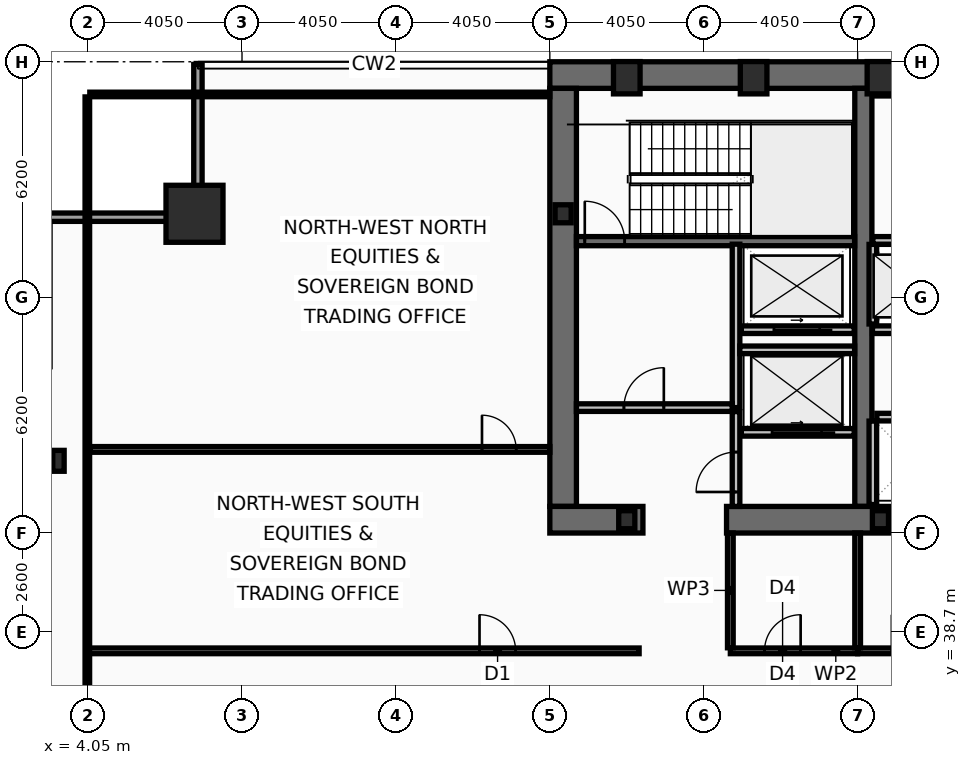
"""IFC4 building model, lengths in metres.
Left out: names, types, materials, properties, quantities, classifications, styles, units other than length and angle.
Written with IfcOpenShell. Run it as: python <this file> out.ifc"""

import sys

from ifc_helpers import new_model, si_unit, direction, frame, frame_2d, origin, origin_2d, place, context, subcontext, project, spatial, rectangle, hollow_rectangle, i_section, extrude, element, fill, save


model = new_model("IFC4")
c1 = context("Model", 3, precision=1e-05, world=origin(), true_north=direction((0.0, 1.0)))
c2 = subcontext(c1, "Body", "Model", "MODEL_VIEW")
j1 = project(units=[si_unit("LENGTHUNIT", "METRE"), si_unit("PLANEANGLEUNIT", "RADIAN")], contexts=[c1])
p1 = place(None, origin())
s1 = spatial("IfcSite", under=j1, at=p1, CompositionType="ELEMENT")
p2 = place(p1, origin())
s2 = spatial("IfcBuilding", under=s1, at=p2, CompositionType="ELEMENT")
p3 = place(p2, frame((0.0, 0.0, 98.6)))
s3 = spatial("IfcBuildingStorey", under=s2, at=p3, CompositionType="ELEMENT", Elevation=98.6)
p4 = place(p3, frame((16.2, 53.35, 0.0), z_axis=(0.0, 0.0, 1.0), x_axis=(1.0, 0.0, 0.0)))
e1 = element("IfcWall", 1, at=p4, inside=s3, PredefinedType="SHEAR", context=c2, shape_type="SweptSolid", body=[
    extrude(rectangle(XDim=40.5, YDim=0.7, at=frame_2d((20.25, 0.0))), origin(), (0.0, 0.0, 1.0), 3.82),
])
p5 = place(p3, frame((16.55, 42.0, 0.0), z_axis=(0.0, 0.0, 1.0), x_axis=(0.0, 1.0, 0.0)))
e2 = element("IfcWall", 2, at=p5, inside=s3, PredefinedType="SHEAR", context=c2, shape_type="SweptSolid", body=[
    extrude(rectangle(XDim=11.0, YDim=0.7, at=frame_2d((5.5, 0.0))), origin(), (0.0, 0.0, 1.0), 3.82),
])
p6 = place(p3, frame((24.45, 42.0, 0.0), z_axis=(0.0, 0.0, 1.0), x_axis=(0.0, 1.0, 0.0)))
e3 = element("IfcWall", 3, at=p6, inside=s3, PredefinedType="SHEAR", context=c2, shape_type="SweptSolid", body=[
    extrude(rectangle(XDim=11.0, YDim=0.45, at=frame_2d((5.5, 0.0))), origin(), (0.0, 0.0, 1.0), 3.82),
])
p7 = place(p3, frame((18.65, 41.65, 0.0), z_axis=(0.0, 0.0, 1.0), x_axis=(-1.0, 0.0, 0.0)))
e4 = element("IfcWall", 4, at=p7, inside=s3, PredefinedType="SHEAR", context=c2, shape_type="SweptSolid", body=[
    extrude(rectangle(XDim=2.45, YDim=0.7, at=frame_2d((1.225, 0.0))), origin(), (0.0, 0.0, 1.0), 3.82),
])
p8 = place(p3, frame((32.3, 41.65, 0.0), z_axis=(0.0, 0.0, 1.0), x_axis=(-1.0, 0.0, 0.0)))
e5 = element("IfcWall", 5, at=p8, inside=s3, PredefinedType="SHEAR", context=c2, shape_type="SweptSolid", body=[
    extrude(rectangle(XDim=11.45, YDim=0.7, at=frame_2d((5.725, 0.0))), origin(), (0.0, 0.0, 1.0), 3.82),
])
p9 = place(p3, frame((16.9, 48.98, 0.0), z_axis=(0.0, 0.0, 1.0), x_axis=(1.0, 0.0, 0.0)))
e6 = element("IfcWall", 6, at=p9, inside=s3, PredefinedType="SHEAR", context=c2, shape_type="SweptSolid", body=[
    extrude(rectangle(XDim=7.32, YDim=0.24, at=frame_2d((3.66, 0.0))), origin(), (0.0, 0.0, 1.0), 3.82),
])
p10 = place(p9, frame((0.22, 0.0, 0.0)))
e7 = element("IfcOpeningElement", 7, at=p10, cuts=e6, PredefinedType="OPENING", context=c2, shape_type="SweptSolid", body=[
    extrude(rectangle(XDim=1.05, YDim=2.15, at=frame_2d((0.525, 1.075))), frame((0.0, 0.13, 0.0), z_axis=(0.0, -1.0, 0.0), x_axis=(1.0, 0.0, 0.0)), (0.0, 0.0, 1.0), 0.26),
])
p11 = place(p3, frame((6.85, 49.7, 0.0), z_axis=(0.0, 0.0, 1.0), x_axis=(1.0, 0.0, 0.0)))
e8 = element("IfcColumn", 8, at=p11, inside=s3, PredefinedType="COLUMN", context=c2, shape_type="SweptSolid", body=[
    extrude(hollow_rectangle(XDim=1.5, YDim=1.5, WallThickness=0.07, at=origin_2d()), origin(), (0.0, 0.0, 1.0), 4.0),
])
for number, where, z_axis, x_axis in (
    (9, (18.225, 53.28, 0.0), (0.0, 0.0, 1.0), (1.0, 0.0, 0.0)),
    (10, (21.562, 53.28, 0.0), (0.0, 0.0, 1.0), (1.0, 0.0, 0.0)),
    (11, (24.9, 53.28, 0.0), (0.0, 0.0, 1.0), (1.0, 0.0, 0.0)),
):
    element("IfcColumn", number, at=place(p3, frame(where, z_axis=z_axis, x_axis=x_axis)), inside=s3, PredefinedType="COLUMN", context=c2, shape_type="SweptSolid", body=[
        extrude(hollow_rectangle(XDim=0.7, YDim=0.85, WallThickness=0.05, at=origin_2d()), origin(), (0.0, 0.0, 1.0), 4.0),
    ])
p12 = place(p3, frame((3.27, 43.2, 0.0), z_axis=(0.0, 0.0, 1.0), x_axis=(1.0, 0.0, 0.0)))
e12 = element("IfcColumn", 12, at=p12, inside=s3, PredefinedType="COLUMN", context=c2, shape_type="SweptSolid", body=[
    extrude(i_section(OverallWidth=0.3, OverallDepth=0.55, WebThickness=0.015, FlangeThickness=0.029, at=origin_2d()), origin(), (0.0, 0.0, 1.0), 4.0),
])
for number, where, z_axis, x_axis in (
    (13, (16.55, 49.7, 0.0), (0.0, 0.0, 1.0), (1.0, 0.0, 0.0)),
    (14, (18.225, 41.65, 0.0), (0.0, 0.0, 1.0), (1.0, 0.0, 0.0)),
    (15, (24.9, 41.65, 0.0), (0.0, 0.0, 1.0), (1.0, 0.0, 0.0)),
):
    element("IfcColumn", number, at=place(p3, frame(where, z_axis=z_axis, x_axis=x_axis)), inside=s3, PredefinedType="COLUMN", context=c2, shape_type="SweptSolid", body=[
        extrude(i_section(OverallWidth=0.424, OverallDepth=0.474, WebThickness=0.048, FlangeThickness=0.077, at=origin_2d()), origin(), (0.0, 0.0, 1.0), 4.0),
    ])
p13 = place(p3, frame((2.83, 49.61, 0.0), z_axis=(0.0, 0.0, 1.0), x_axis=(1.0, 0.0, 0.0)))
e16 = element("IfcWall", 16, at=p13, inside=s3, PredefinedType="SOLIDWALL", context=c2, shape_type="SweptSolid", body=[
    extrude(rectangle(XDim=4.22, YDim=0.22, at=frame_2d((2.11, 0.0))), origin(), (0.0, 0.0, 1.0), 3.16),
])
p14 = place(p3, frame((6.94, 49.72, 0.0), z_axis=(0.0, 0.0, 1.0), x_axis=(0.0, 1.0, 0.0)))
e17 = element("IfcWall", 17, at=p14, inside=s3, PredefinedType="SOLIDWALL", context=c2, shape_type="SweptSolid", body=[
    extrude(rectangle(XDim=3.91, YDim=0.22, at=frame_2d((1.955, 0.0))), origin(), (0.0, 0.0, 1.0), 3.16),
])
p15 = place(p3, frame((24.21, 43.95, 0.0), z_axis=(0.0, 0.0, 1.0), x_axis=(-1.0, 0.0, 0.0)))
e18 = element("IfcWall", 18, at=p15, inside=s3, PredefinedType="PARTITIONING", context=c2, shape_type="SweptSolid", body=[
    extrude(rectangle(XDim=2.97, YDim=0.2, at=frame_2d((1.485, 0.0))), origin(), (0.0, 0.0, 1.0), 3.82),
])
p16 = place(p15, frame((0.86, 0.0, 0.0)))
e19 = element("IfcOpeningElement", 19, at=p16, cuts=e18, PredefinedType="OPENING", context=c2, shape_type="SweptSolid", body=[
    extrude(rectangle(XDim=1.3, YDim=2.18, at=frame_2d((0.65, 1.09))), frame((0.0, 0.11, 0.0), z_axis=(0.0, -1.0, 0.0), x_axis=(1.0, 0.0, 0.0)), (0.0, 0.0, 1.0), 0.22),
])
p17 = place(p3, frame((24.21, 46.65, 0.0), z_axis=(0.0, 0.0, 1.0), x_axis=(-1.0, 0.0, 0.0)))
e20 = element("IfcWall", 20, at=p17, inside=s3, PredefinedType="PARTITIONING", context=c2, shape_type="SweptSolid", body=[
    extrude(rectangle(XDim=2.97, YDim=0.2, at=frame_2d((1.485, 0.0))), origin(), (0.0, 0.0, 1.0), 3.82),
])
p18 = place(p17, frame((0.91, 0.0, 0.0)))
e21 = element("IfcOpeningElement", 21, at=p18, cuts=e20, PredefinedType="OPENING", context=c2, shape_type="SweptSolid", body=[
    extrude(rectangle(XDim=1.2, YDim=2.18, at=frame_2d((0.6, 1.09))), frame((0.0, 0.11, 0.0), z_axis=(0.0, -1.0, 0.0), x_axis=(1.0, 0.0, 0.0)), (0.0, 0.0, 1.0), 0.22),
])
p19 = place(p3, frame((31.22, 46.65, 0.0), z_axis=(0.0, 0.0, 1.0), x_axis=(-1.0, 0.0, 0.0)))
e22 = element("IfcWall", 22, at=p19, inside=s3, PredefinedType="PARTITIONING", context=c2, shape_type="SweptSolid", body=[
    extrude(rectangle(XDim=6.53, YDim=0.2, at=frame_2d((3.265, 0.0))), origin(), (0.0, 0.0, 1.0), 3.82),
])
p20 = place(p19, frame((4.9, 0.0, 0.0)))
e23 = element("IfcOpeningElement", 23, at=p20, cuts=e22, PredefinedType="OPENING", context=c2, shape_type="SweptSolid", body=[
    extrude(rectangle(XDim=1.1, YDim=2.18, at=frame_2d((0.55, 1.09))), frame((0.0, 0.11, 0.0), z_axis=(0.0, -1.0, 0.0), x_axis=(1.0, 0.0, 0.0)), (0.0, 0.0, 1.0), 0.22),
])
p21 = place(p19, frame((2.74, 0.0, 0.0)))
e24 = element("IfcOpeningElement", 24, at=p21, cuts=e22, PredefinedType="OPENING", context=c2, shape_type="SweptSolid", body=[
    extrude(rectangle(XDim=1.1, YDim=2.18, at=frame_2d((0.55, 1.09))), frame((0.0, 0.11, 0.0), z_axis=(0.0, -1.0, 0.0), x_axis=(1.0, 0.0, 0.0)), (0.0, 0.0, 1.0), 0.22),
])
p22 = place(p19, frame((0.58, 0.0, 0.0)))
e25 = element("IfcOpeningElement", 25, at=p22, cuts=e22, PredefinedType="OPENING", context=c2, shape_type="SweptSolid", body=[
    extrude(rectangle(XDim=1.1, YDim=2.18, at=frame_2d((0.55, 1.09))), frame((0.0, 0.11, 0.0), z_axis=(0.0, -1.0, 0.0), x_axis=(1.0, 0.0, 0.0)), (0.0, 0.0, 1.0), 0.22),
])
p23 = place(p3, frame((21.1, 44.6, 0.0), z_axis=(0.0, 0.0, 1.0), x_axis=(0.0, 1.0, 0.0)))
e26 = element("IfcWall", 26, at=p23, inside=s3, PredefinedType="PARTITIONING", context=c2, shape_type="SweptSolid", body=[
    extrude(rectangle(XDim=4.3, YDim=0.2, at=frame_2d((2.15, 0.0))), origin(), (0.0, 0.0, 1.0), 3.82),
])
p24 = place(p3, frame((16.9, 44.6, 0.0), z_axis=(0.0, 0.0, 1.0), x_axis=(1.0, 0.0, 0.0)))
e27 = element("IfcWall", 27, at=p24, inside=s3, PredefinedType="PARTITIONING", context=c2, shape_type="SweptSolid", body=[
    extrude(rectangle(XDim=4.1, YDim=0.2, at=frame_2d((2.05, 0.0))), origin(), (0.0, 0.0, 1.0), 3.82),
])
p25 = place(p24, frame((1.25, 0.0, 0.0)))
e28 = element("IfcOpeningElement", 28, at=p25, cuts=e27, PredefinedType="OPENING", context=c2, shape_type="SweptSolid", body=[
    extrude(rectangle(XDim=1.05, YDim=2.15, at=frame_2d((0.525, 1.075))), frame((0.0, 0.11, 0.0), z_axis=(0.0, -1.0, 0.0), x_axis=(1.0, 0.0, 0.0)), (0.0, 0.0, 1.0), 0.22),
])
p26 = place(p3, frame((21.2, 46.12, 0.0), z_axis=(0.0, 0.0, 1.0), x_axis=(1.0, 0.0, 0.0)))
e29 = element("IfcWall", 29, at=p26, inside=s3, PredefinedType="PARTITIONING", context=c2, shape_type="SweptSolid", body=[
    extrude(rectangle(XDim=3.02, YDim=0.2, at=frame_2d((1.51, 0.0))), origin(), (0.0, 0.0, 1.0), 3.82),
])
p27 = place(p3, frame((21.1, 42.0, 0.0), z_axis=(0.0, 0.0, 1.0), x_axis=(0.0, 1.0, 0.0)))
e30 = element("IfcWall", 30, at=p27, inside=s3, PredefinedType="PARTITIONING", context=c2, shape_type="SweptSolid", body=[
    extrude(rectangle(XDim=2.495, YDim=0.2, at=frame_2d((1.248, 0.0))), origin(), (0.0, 0.0, 1.0), 3.82),
])
p28 = place(p27, frame((0.38, 0.0, 0.0)))
e31 = element("IfcOpeningElement", 31, at=p28, cuts=e30, PredefinedType="OPENING", context=c2, shape_type="SweptSolid", body=[
    extrude(rectangle(XDim=1.05, YDim=2.15, at=frame_2d((0.525, 1.075))), frame((0.0, 0.11, 0.0), z_axis=(0.0, -1.0, 0.0), x_axis=(1.0, 0.0, 0.0)), (0.0, 0.0, 1.0), 0.22),
])
p29 = place(p3, frame((24.7, 46.8, 0.0), z_axis=(0.0, 0.0, 1.0), x_axis=(0.0, 1.0, 0.0)))
e32 = element("IfcWall", 32, at=p29, inside=s3, PredefinedType="PARTITIONING", context=c2, shape_type="SweptSolid", body=[
    extrude(rectangle(XDim=2.095, YDim=0.2, at=frame_2d((1.047, 0.0))), origin(), (0.0, 0.0, 1.0), 3.82),
])
p30 = place(p3, frame((24.805, 44.35, 0.0), z_axis=(0.0, 0.0, 1.0), x_axis=(1.0, 0.0, 0.0)))
e33 = element("IfcWall", 33, at=p30, inside=s3, PredefinedType="PARTITIONING", context=c2, shape_type="SweptSolid", body=[
    extrude(rectangle(XDim=6.27, YDim=0.2, at=frame_2d((3.135, 0.0))), origin(), (0.0, 0.0, 1.0), 3.82),
])
p31 = place(p3, frame((24.7, 42.05, 0.0), z_axis=(0.0, 0.0, 1.0), x_axis=(0.0, 1.0, 0.0)))
e34 = element("IfcWall", 34, at=p31, inside=s3, PredefinedType="PARTITIONING", context=c2, shape_type="SweptSolid", body=[
    extrude(rectangle(XDim=2.195, YDim=0.2, at=frame_2d((1.098, 0.0))), origin(), (0.0, 0.0, 1.0), 3.82),
])
p32 = place(p3, frame((24.7, 52.86, 0.0), z_axis=(0.0, 0.0, 1.0), x_axis=(1.0, 0.0, 0.0)))
e35 = element("IfcWall", 35, at=p32, inside=s3, PredefinedType="PARTITIONING", context=c2, shape_type="SweptSolid", body=[
    extrude(rectangle(XDim=7.72, YDim=0.12, at=frame_2d((3.86, 0.0))), origin(), (0.0, 0.0, 1.0), 3.82),
])
p33 = place(p3, frame((24.7, 49.0, 0.0), z_axis=(0.0, 0.0, 1.0), x_axis=(1.0, 0.0, 0.0)))
e36 = element("IfcWall", 36, at=p33, inside=s3, PredefinedType="PARTITIONING", context=c2, shape_type="SweptSolid", body=[
    extrude(rectangle(XDim=7.72, YDim=0.2, at=frame_2d((3.86, 0.0))), origin(), (0.0, 0.0, 1.0), 3.82),
])
p34 = place(p33, frame((6.56, 0.0, 0.0)))
e37 = element("IfcOpeningElement", 37, at=p34, cuts=e36, PredefinedType="OPENING", context=c2, shape_type="SweptSolid", body=[
    extrude(rectangle(XDim=0.95, YDim=2.1, at=frame_2d((0.475, 1.05))), frame((0.0, 0.11, 0.0), z_axis=(0.0, -1.0, 0.0), x_axis=(1.0, 0.0, 0.0)), (0.0, 0.0, 1.0), 0.22),
])
p35 = place(p3, frame((20.95, 38.2, 0.0), z_axis=(0.0, 0.0, 1.0), x_axis=(1.0, 0.0, 0.0)))
e38 = element("IfcWall", 38, at=p35, inside=s3, PredefinedType="PARTITIONING", context=c2, shape_type="SweptSolid", body=[
    extrude(rectangle(XDim=3.35, YDim=0.15, at=frame_2d((1.675, 0.0))), origin(), (0.0, 0.0, 1.0), 3.82),
])
p36 = place(p35, frame((0.9, 0.0, 0.0)))
e39 = element("IfcOpeningElement", 39, at=p36, cuts=e38, PredefinedType="OPENING", context=c2, shape_type="SweptSolid", body=[
    extrude(rectangle(XDim=0.95, YDim=2.05, at=frame_2d((0.475, 1.025))), frame((0.0, 0.085, 0.0), z_axis=(0.0, -1.0, 0.0), x_axis=(1.0, 0.0, 0.0)), (0.0, 0.0, 1.0), 0.17),
])
p37 = place(p3, frame((24.3, 38.2, 0.0), z_axis=(0.0, 0.0, 1.0), x_axis=(1.0, 0.0, 0.0)))
e40 = element("IfcWall", 40, at=p37, inside=s3, PredefinedType="PARTITIONING", context=c2, shape_type="SweptSolid", body=[
    extrude(rectangle(XDim=4.5, YDim=0.15, at=frame_2d((2.25, 0.0))), origin(), (0.0, 0.0, 1.0), 3.01),
])
p38 = place(p37, frame((0.9, 0.0, 0.0)))
e41 = element("IfcOpeningElement", 41, at=p38, cuts=e40, PredefinedType="OPENING", context=c2, shape_type="SweptSolid", body=[
    extrude(rectangle(XDim=0.95, YDim=2.05, at=frame_2d((0.475, 1.025))), frame((0.0, 0.085, 0.0), z_axis=(0.0, -1.0, 0.0), x_axis=(1.0, 0.0, 0.0)), (0.0, 0.0, 1.0), 0.17),
])
for number, where, z_axis, x_axis in (
    (42, (20.95, 38.28, 0.0), (0.0, 0.0, 1.0), (0.0, 1.0, 0.0)),
    (43, (24.3, 38.28, 0.0), (0.0, 0.0, 1.0), (0.0, 1.0, 0.0)),
):
    element("IfcWall", number, at=place(p3, frame(where, z_axis=z_axis, x_axis=x_axis)), inside=s3, PredefinedType="PARTITIONING", context=c2, shape_type="SweptSolid", body=[
        extrude(rectangle(XDim=3.02, YDim=0.15, at=frame_2d((1.51, 0.0))), origin(), (0.0, 0.0, 1.0), 3.82),
    ])
p39 = place(p3, frame((4.03, 38.2, 0.0), z_axis=(0.0, 0.0, 1.0), x_axis=(1.0, 0.0, 0.0)))
e44 = element("IfcWall", 44, at=p39, inside=s3, PredefinedType="PARTITIONING", context=c2, shape_type="SweptSolid", body=[
    extrude(rectangle(XDim=14.52, YDim=0.15, at=frame_2d((7.26, 0.0))), origin(), (0.0, 0.0, 1.0), 3.01),
])
p40 = place(p39, frame((10.32, 0.0, 0.0)))
e45 = element("IfcOpeningElement", 45, at=p40, cuts=e44, PredefinedType="OPENING", context=c2, shape_type="SweptSolid", body=[
    extrude(rectangle(XDim=0.95, YDim=2.05, at=frame_2d((0.475, 1.025))), frame((0.0, 0.085, 0.0), z_axis=(0.0, -1.0, 0.0), x_axis=(1.0, 0.0, 0.0)), (0.0, 0.0, 1.0), 0.17),
])
p41 = place(p3, frame((4.095, 43.5, 0.0), z_axis=(0.0, 0.0, 1.0), x_axis=(1.0, 0.0, 0.0)))
e46 = element("IfcWall", 46, at=p41, inside=s3, PredefinedType="PARTITIONING", context=c2, shape_type="SweptSolid", body=[
    extrude(rectangle(XDim=12.105, YDim=0.15, at=frame_2d((6.052, 0.0))), origin(), (0.0, 0.0, 1.0), 3.01),
])
p42 = place(p41, frame((10.32, 0.0, 0.0)))
e47 = element("IfcOpeningElement", 47, at=p42, cuts=e46, PredefinedType="OPENING", context=c2, shape_type="SweptSolid", body=[
    extrude(rectangle(XDim=0.9, YDim=2.05, at=frame_2d((0.45, 1.025))), frame((0.0, 0.085, 0.0), z_axis=(0.0, -1.0, 0.0), x_axis=(1.0, 0.0, 0.0)), (0.0, 0.0, 1.0), 0.17),
])
p43 = place(p3, frame((4.03, 10.665, 0.0), z_axis=(0.0, 0.0, 1.0), x_axis=(0.0, 1.0, 0.0)))
e48 = element("IfcWall", 48, at=p43, inside=s3, PredefinedType="PARTITIONING", context=c2, shape_type="SweptSolid", body=[
    extrude(rectangle(XDim=42.11, YDim=0.12, at=frame_2d((21.055, 0.0))), origin(), (0.0, 0.0, 1.0), 3.01),
])
p44 = place(p3, frame((4.095, 52.84, 0.0), z_axis=(0.0, 0.0, 1.0), x_axis=(1.0, 0.0, 0.0)))
e49 = element("IfcWall", 49, at=p44, inside=s3, PredefinedType="PARTITIONING", context=c2, shape_type="SweptSolid", body=[
    extrude(rectangle(XDim=12.105, YDim=0.12, at=frame_2d((6.052, 0.0))), origin(), (0.0, 0.0, 1.0), 3.82),
])
p45 = place(p10, origin())
e50 = element("IfcDoor", 50, at=p45, inside=s3, OperationType="SINGLE_SWING_LEFT", PredefinedType="DOOR", context=c2, shape_type="SweptSolid", body=[
    extrude(rectangle(XDim=1.05, YDim=2.15, at=frame_2d((0.525, 1.075))), frame((0.0, 0.025, 0.0), z_axis=(0.0, -1.0, 0.0), x_axis=(1.0, 0.0, 0.0)), (0.0, 0.0, 1.0), 0.05),
])
fill(e7, e50)
p46 = place(p16, origin())
e51 = element("IfcDoor", 51, at=p46, inside=s3, OperationType="SLIDING_TO_LEFT", PredefinedType="DOOR", context=c2, shape_type="SweptSolid", body=[
    extrude(rectangle(XDim=1.3, YDim=2.18, at=frame_2d((0.65, 1.09))), frame((0.0, 0.025, 0.0), z_axis=(0.0, -1.0, 0.0), x_axis=(1.0, 0.0, 0.0)), (0.0, 0.0, 1.0), 0.05),
])
fill(e19, e51)
p47 = place(p18, origin())
e52 = element("IfcDoor", 52, at=p47, inside=s3, OperationType="SLIDING_TO_LEFT", PredefinedType="DOOR", context=c2, shape_type="SweptSolid", body=[
    extrude(rectangle(XDim=1.2, YDim=2.18, at=frame_2d((0.6, 1.09))), frame((0.0, 0.025, 0.0), z_axis=(0.0, -1.0, 0.0), x_axis=(1.0, 0.0, 0.0)), (0.0, 0.0, 1.0), 0.05),
])
fill(e21, e52)
p48 = place(p25, origin())
e53 = element("IfcDoor", 53, at=p48, inside=s3, OperationType="SINGLE_SWING_RIGHT", PredefinedType="DOOR", context=c2, shape_type="SweptSolid", body=[
    extrude(rectangle(XDim=1.05, YDim=2.15, at=frame_2d((0.525, 1.075))), frame((0.0, 0.025, 0.0), z_axis=(0.0, -1.0, 0.0), x_axis=(1.0, 0.0, 0.0)), (0.0, 0.0, 1.0), 0.05),
])
fill(e28, e53)
p49 = place(p28, origin())
e54 = element("IfcDoor", 54, at=p49, inside=s3, OperationType="SINGLE_SWING_LEFT", PredefinedType="DOOR", context=c2, shape_type="SweptSolid", body=[
    extrude(rectangle(XDim=1.05, YDim=2.15, at=frame_2d((0.525, 1.075))), frame((0.0, 0.025, 0.0), z_axis=(0.0, -1.0, 0.0), x_axis=(1.0, 0.0, 0.0)), (0.0, 0.0, 1.0), 0.05),
])
fill(e31, e54)
p50 = place(p36, origin())
e55 = element("IfcDoor", 55, at=p50, inside=s3, OperationType="SINGLE_SWING_RIGHT", PredefinedType="DOOR", context=c2, shape_type="SweptSolid", body=[
    extrude(rectangle(XDim=0.95, YDim=2.05, at=frame_2d((0.475, 1.025))), frame((0.0, 0.025, 0.0), z_axis=(0.0, -1.0, 0.0), x_axis=(1.0, 0.0, 0.0)), (0.0, 0.0, 1.0), 0.05),
])
fill(e39, e55)
p51 = place(p40, origin())
e56 = element("IfcDoor", 56, at=p51, inside=s3, OperationType="SINGLE_SWING_LEFT", PredefinedType="DOOR", context=c2, shape_type="SweptSolid", body=[
    extrude(rectangle(XDim=0.95, YDim=2.05, at=frame_2d((0.475, 1.025))), frame((0.0, 0.025, 0.0), z_axis=(0.0, -1.0, 0.0), x_axis=(1.0, 0.0, 0.0)), (0.0, 0.0, 1.0), 0.05),
])
fill(e45, e56)
p52 = place(p42, origin())
e57 = element("IfcDoor", 57, at=p52, inside=s3, OperationType="SINGLE_SWING_LEFT", PredefinedType="DOOR", context=c2, shape_type="SweptSolid", body=[
    extrude(rectangle(XDim=0.9, YDim=2.05, at=frame_2d((0.45, 1.025))), frame((0.0, 0.025, 0.0), z_axis=(0.0, -1.0, 0.0), x_axis=(1.0, 0.0, 0.0)), (0.0, 0.0, 1.0), 0.05),
])
fill(e47, e57)
save(model, sys.argv[1])
